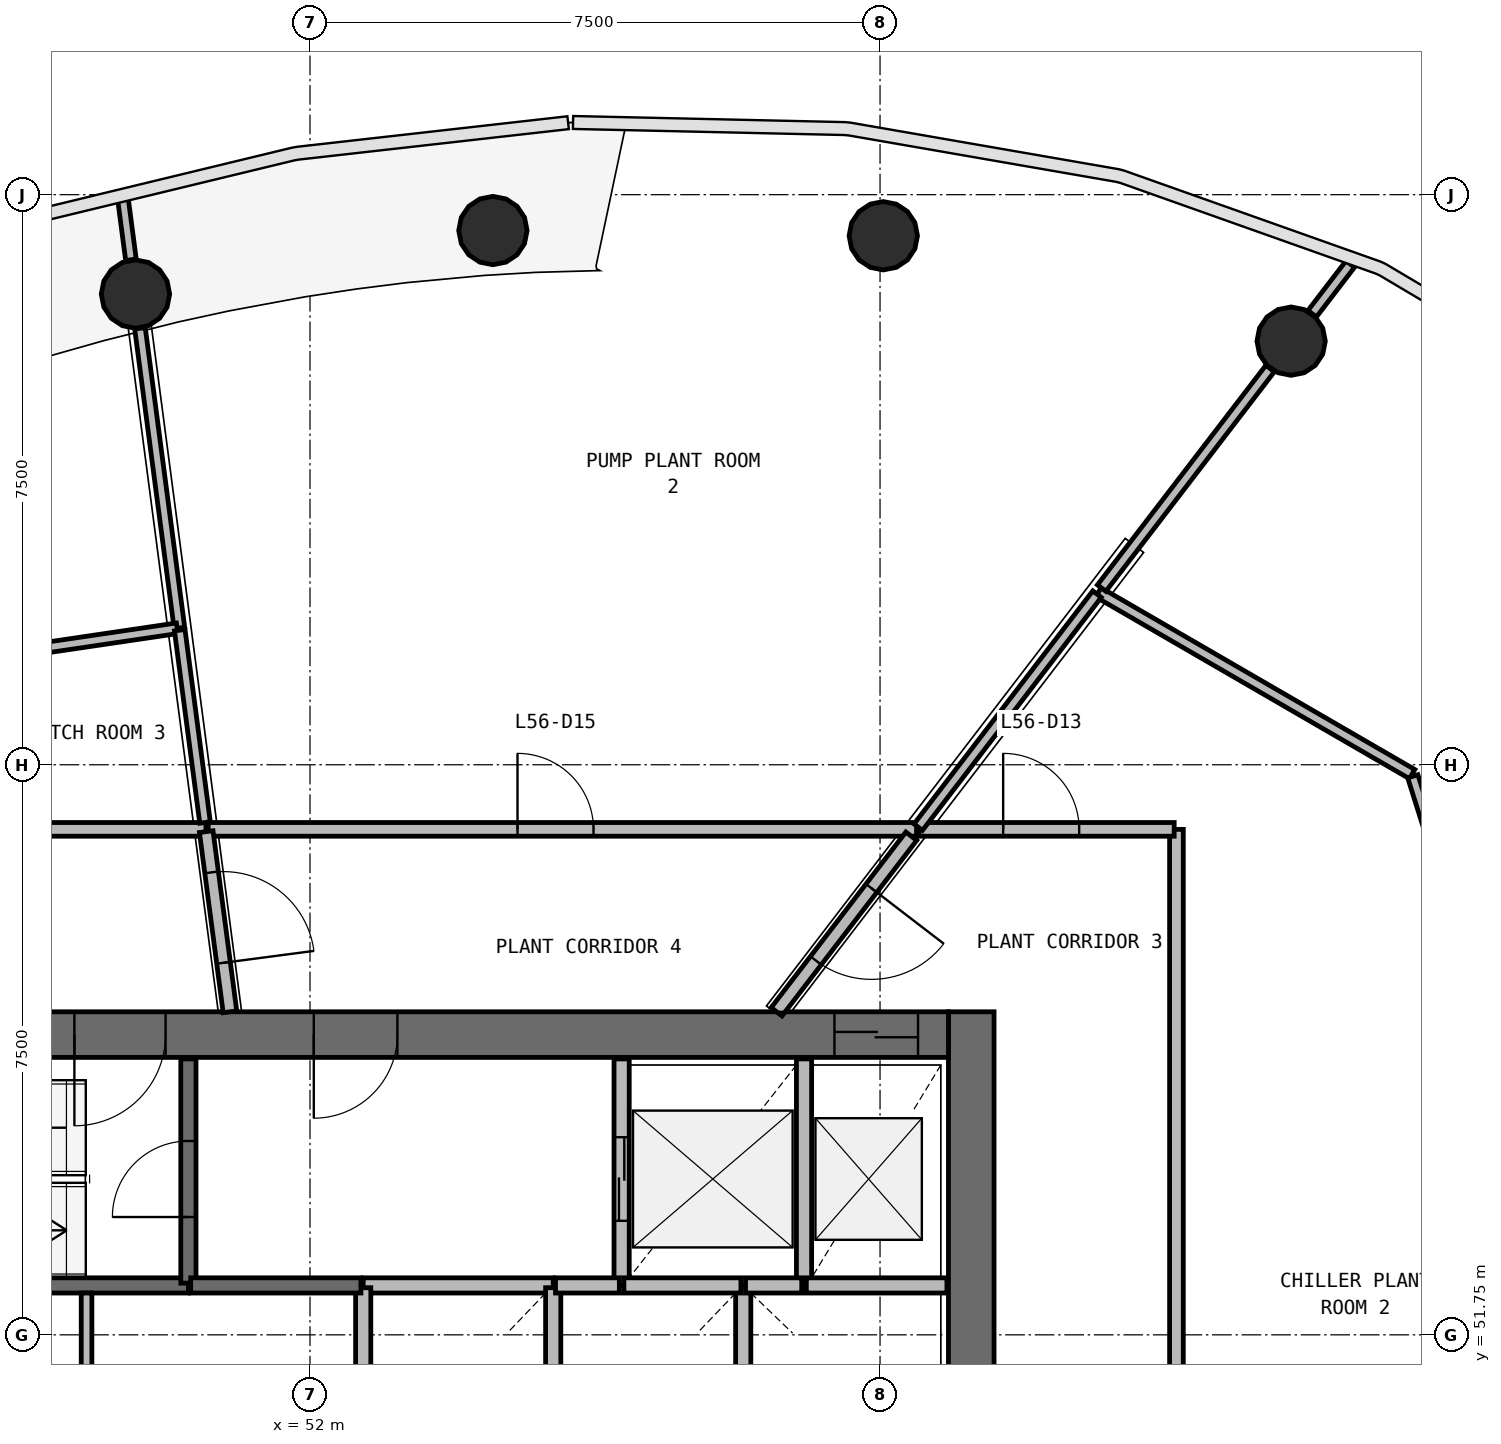
"""IFC4 building model, lengths in metres.
Left out: names, types, materials, properties, quantities, classifications, styles, units other than length and angle.
Written with IfcOpenShell. Run it as: python <this file> out.ifc"""

import sys

from ifc_helpers import new_model, si_unit, direction, frame, frame_2d, origin, origin_2d, place, context, subcontext, project, spatial, rectangle, circle, extrude, source, transform, mapped, element, fill, save


model = new_model("IFC4")
c1 = context("Model", 3, precision=1e-05, world=origin(), true_north=direction((0.0, 1.0)))
c2 = subcontext(c1, "Body", "Model", "MODEL_VIEW")
j1 = project(units=[si_unit("LENGTHUNIT", "METRE"), si_unit("PLANEANGLEUNIT", "RADIAN")], contexts=[c1])
p1 = place(None, origin())
s1 = spatial("IfcSite", under=j1, at=p1, CompositionType="ELEMENT")
p2 = place(p1, origin())
s2 = spatial("IfcBuilding", under=s1, at=p2, CompositionType="ELEMENT")
p3 = place(p2, frame((0.0, 0.0, 230.6)))
s3 = spatial("IfcBuildingStorey", under=s2, at=p3, CompositionType="ELEMENT", Elevation=230.6)
p4 = place(p3, frame((60.7, 40.0, 0.0), z_axis=(0.0, 0.0, 1.0), x_axis=(0.0, 1.0, 0.0)))
e1 = element("IfcWall", 1, at=p4, inside=s3, PredefinedType="SHEAR", context=c2, shape_type="SweptSolid", body=[
    extrude(rectangle(XDim=16.0, YDim=0.6, at=frame_2d((8.0, 0.0))), origin(), (0.0, 0.0, 1.0), 3.9),
])
p5 = place(p4, frame((7.1, 0.0, 0.0)))
e2 = element("IfcOpeningElement", 2, at=p5, cuts=e1, PredefinedType="OPENING", context=c2, shape_type="SweptSolid", body=[
    extrude(rectangle(XDim=1.8, YDim=2.1, at=frame_2d((0.9, 1.05))), frame((0.0, 0.31, 0.0), z_axis=(0.0, -1.0, 0.0), x_axis=(1.0, 0.0, 0.0)), (0.0, 0.0, 1.0), 0.62),
])
p6 = place(p3, frame((60.4, 55.7, 0.0), z_axis=(0.0, 0.0, 1.0), x_axis=(-1.0, 0.0, 0.0)))
e3 = element("IfcWall", 3, at=p6, inside=s3, PredefinedType="SHEAR", context=c2, shape_type="SweptSolid", body=[
    extrude(rectangle(XDim=16.8, YDim=0.6, at=frame_2d((8.4, 0.0))), origin(), (0.0, 0.0, 1.0), 3.9),
])
p7 = place(p6, frame((0.4, 0.0, 0.0)))
e4 = element("IfcOpeningElement", 4, at=p7, cuts=e3, PredefinedType="OPENING", context=c2, shape_type="SweptSolid", body=[
    extrude(rectangle(XDim=1.1, YDim=2.1, at=frame_2d((0.55, 1.05))), frame((0.0, 0.31, 0.0), z_axis=(0.0, -1.0, 0.0), x_axis=(1.0, 0.0, 0.0)), (0.0, 0.0, 1.0), 0.62),
])
p8 = place(p6, frame((10.3, 0.0, 0.0)))
e5 = element("IfcOpeningElement", 5, at=p8, cuts=e3, PredefinedType="OPENING", context=c2, shape_type="SweptSolid", body=[
    extrude(rectangle(XDim=1.2, YDim=2.1, at=frame_2d((0.6, 1.05))), frame((0.0, 0.31, 0.0), z_axis=(0.0, -1.0, 0.0), x_axis=(1.0, 0.0, 0.0)), (0.0, 0.0, 1.0), 0.62),
])
p9 = place(p6, frame((7.25, 0.0, 0.0)))
e6 = element("IfcOpeningElement", 6, at=p9, cuts=e3, PredefinedType="OPENING", context=c2, shape_type="SweptSolid", body=[
    extrude(rectangle(XDim=1.1, YDim=2.1, at=frame_2d((0.55, 1.05))), frame((0.0, 0.31, 0.0), z_axis=(0.0, -1.0, 0.0), x_axis=(1.0, 0.0, 0.0)), (0.0, 0.0, 1.0), 0.62),
])
m1 = source(origin(), c2, "Body", "SweptSolid", [
    extrude(circle(Radius=0.45, at=origin_2d()), origin(), (0.0, 0.0, 1.0), 3.58),
])
for number, where, z_axis, x_axis in (
    (7, (64.909, 64.823, 0.0), (0.0, 0.0, 1.0), (1.0, 0.0, 0.0)),
    (8, (59.543, 66.21, 0.0), (0.0, 0.0, 1.0), (1.0, 0.0, 0.0)),
    (9, (54.406, 66.278, 0.0), (0.0, 0.0, 1.0), (1.0, 0.0, 0.0)),
    (10, (49.704, 65.442, 0.0), (0.0, 0.0, 1.0), (1.0, 0.0, 0.0)),
):
    element("IfcColumn", number, at=place(p3, frame(where, z_axis=z_axis, x_axis=x_axis)), inside=s3, PredefinedType="COLUMN", context=c2, shape_type="MappedRepresentation", body=[
        mapped(m1, transform((0.0, 0.0, 0.0), scale=1.0)),
    ])
p10 = place(p3, frame((43.62, 52.4, 0.0), z_axis=(0.0, 0.0, 1.0), x_axis=(1.0, 0.0, 0.0)))
e11 = element("IfcWall", 11, at=p10, inside=s3, PredefinedType="SOLIDWALL", context=c2, shape_type="SweptSolid", body=[
    extrude(rectangle(XDim=6.78, YDim=0.2, at=frame_2d((3.39, 0.0))), origin(), (0.0, 0.0, 1.0), 3.58),
])
p11 = place(p3, frame((50.4, 52.43, 0.0), z_axis=(0.0, 0.0, 1.0), x_axis=(0.0, 1.0, 0.0)))
e12 = element("IfcWall", 12, at=p11, inside=s3, PredefinedType="SOLIDWALL", context=c2, shape_type="SweptSolid", body=[
    extrude(rectangle(XDim=2.95, YDim=0.2, at=frame_2d((1.475, 0.0))), origin(), (0.0, 0.0, 1.0), 3.58),
])
p12 = place(p11, frame((0.87, 0.0, 0.0)))
e13 = element("IfcOpeningElement", 13, at=p12, cuts=e12, PredefinedType="OPENING", context=c2, shape_type="SweptSolid", body=[
    extrude(rectangle(XDim=1.0, YDim=2.1, at=frame_2d((0.5, 1.05))), frame((0.0, 0.11, 0.0), z_axis=(0.0, -1.0, 0.0), x_axis=(1.0, 0.0, 0.0)), (0.0, 0.0, 1.0), 0.22),
])
p13 = place(p3, frame((56.1, 55.38, 0.0), z_axis=(0.0, 0.0, 1.0), x_axis=(0.0, -1.0, 0.0)))
e14 = element("IfcWall", 14, at=p13, inside=s3, PredefinedType="SOLIDWALL", context=c2, shape_type="SweptSolid", body=[
    extrude(rectangle(XDim=2.98, YDim=0.2, at=frame_2d((1.49, 0.0))), origin(), (0.0, 0.0, 1.0), 3.58),
])
p14 = place(p13, frame((1.03, 0.0, 0.0)))
e15 = element("IfcOpeningElement", 15, at=p14, cuts=e14, PredefinedType="OPENING", context=c2, shape_type="SweptSolid", body=[
    extrude(rectangle(XDim=1.1, YDim=2.1, at=frame_2d((0.55, 1.05))), frame((0.0, 0.11, 0.0), z_axis=(0.0, -1.0, 0.0), x_axis=(1.0, 0.0, 0.0)), (0.0, 0.0, 1.0), 0.22),
])
p15 = place(p3, frame((58.5, 52.4, 0.0), z_axis=(0.0, 0.0, 1.0), x_axis=(0.0, 1.0, 0.0)))
e16 = element("IfcWall", 16, at=p15, inside=s3, PredefinedType="SOLIDWALL", context=c2, shape_type="SweptSolid", body=[
    extrude(rectangle(XDim=2.98, YDim=0.2, at=frame_2d((1.49, 0.0))), origin(), (0.0, 0.0, 1.0), 3.58),
])
p16 = place(p3, frame((55.2, 52.4, 0.0), z_axis=(0.0, 0.0, 1.0), x_axis=(-1.0, 0.0, 0.0)))
e17 = element("IfcWall", 17, at=p16, inside=s3, PredefinedType="SOLIDWALL", context=c2, shape_type="SweptSolid", body=[
    extrude(rectangle(XDim=2.5, YDim=0.2, at=frame_2d((1.25, 0.0))), origin(), (0.0, 0.0, 1.0), 3.58),
])
for number, where, z_axis, x_axis in (
    (18, (52.7, 52.37, 0.0), (0.0, 0.0, 1.0), (0.0, -1.0, 0.0)),
    (19, (55.2, 50.01, 0.0), (0.0, 0.0, 1.0), (0.0, 1.0, 0.0)),
):
    element("IfcWall", number, at=place(p3, frame(where, z_axis=z_axis, x_axis=x_axis)), inside=s3, PredefinedType="SOLIDWALL", context=c2, shape_type="SweptSolid", body=[
        extrude(rectangle(XDim=2.36, YDim=0.2, at=frame_2d((1.18, 0.0))), origin(), (0.0, 0.0, 1.0), 3.58),
    ])
p17 = place(p3, frame((57.7, 50.01, 0.0), z_axis=(0.0, 0.0, 1.0), x_axis=(0.0, 1.0, 0.0)))
e20 = element("IfcWall", 20, at=p17, inside=s3, PredefinedType="SOLIDWALL", context=c2, shape_type="SweptSolid", body=[
    extrude(rectangle(XDim=2.39, YDim=0.2, at=frame_2d((1.195, 0.0))), origin(), (0.0, 0.0, 1.0), 3.58),
])
p18 = place(p3, frame((50.43, 52.4, 0.0), z_axis=(0.0, 0.0, 1.0), x_axis=(1.0, 0.0, 0.0)))
e21 = element("IfcWall", 21, at=p18, inside=s3, PredefinedType="SOLIDWALL", context=c2, shape_type="SweptSolid", body=[
    extrude(rectangle(XDim=2.24, YDim=0.2, at=frame_2d((1.12, 0.0))), origin(), (0.0, 0.0, 1.0), 3.58),
])
p19 = place(p3, frame((60.38, 52.4, 0.0), z_axis=(0.0, 0.0, 1.0), x_axis=(-1.0, 0.0, 0.0)))
e22 = element("IfcWall", 22, at=p19, inside=s3, PredefinedType="SOLIDWALL", context=c2, shape_type="SweptSolid", body=[
    extrude(rectangle(XDim=1.85, YDim=0.2, at=frame_2d((0.925, 0.0))), origin(), (0.0, 0.0, 1.0), 3.58),
])
p20 = place(p3, frame((57.67, 52.4, 0.0), z_axis=(0.0, 0.0, 1.0), x_axis=(-1.0, 0.0, 0.0)))
e23 = element("IfcWall", 23, at=p20, inside=s3, PredefinedType="SOLIDWALL", context=c2, shape_type="SweptSolid", body=[
    extrude(rectangle(XDim=1.54, YDim=0.2, at=frame_2d((0.77, 0.0))), origin(), (0.0, 0.0, 1.0), 3.58),
])
p21 = place(p3, frame((56.07, 52.4, 0.0), z_axis=(0.0, 0.0, 1.0), x_axis=(-1.0, 0.0, 0.0)))
e24 = element("IfcWall", 24, at=p21, inside=s3, PredefinedType="SOLIDWALL", context=c2, shape_type="SweptSolid", body=[
    extrude(rectangle(XDim=0.84, YDim=0.2, at=frame_2d((0.42, 0.0))), origin(), (0.0, 0.0, 1.0), 3.58),
])
p22 = place(p3, frame((58.47, 52.4, 0.0), z_axis=(0.0, 0.0, 1.0), x_axis=(-1.0, 0.0, 0.0)))
e25 = element("IfcWall", 25, at=p22, inside=s3, PredefinedType="SOLIDWALL", context=c2, shape_type="SweptSolid", body=[
    extrude(rectangle(XDim=0.74, YDim=0.2, at=frame_2d((0.37, 0.0))), origin(), (0.0, 0.0, 1.0), 3.58),
])
p23 = place(p3, frame((40.6, 58.4, 0.0), z_axis=(0.0, 0.0, 1.0), x_axis=(1.0, 0.0, 0.0)))
e26 = element("IfcWall", 26, at=p23, inside=s3, PredefinedType="PARTITIONING", context=c2, shape_type="SweptSolid", body=[
    extrude(rectangle(XDim=10.031, YDim=0.18, at=frame_2d((5.015, 0.0))), origin(), (0.0, 0.0, 1.0), 2.38),
])
p24 = place(p23, frame((4.581, 0.0, 0.0)))
e27 = element("IfcOpeningElement", 27, at=p24, cuts=e26, PredefinedType="OPENING", context=c2, shape_type="SweptSolid", body=[
    extrude(rectangle(XDim=1.0, YDim=2.1, at=frame_2d((0.5, 1.05))), frame((0.0, 0.1, 0.0), z_axis=(0.0, -1.0, 0.0), x_axis=(1.0, 0.0, 0.0)), (0.0, 0.0, 1.0), 0.2),
])
p25 = place(p3, frame((50.661, 58.4, 0.0), z_axis=(0.0, 0.0, 1.0), x_axis=(1.0, 0.0, 0.0)))
e28 = element("IfcWall", 28, at=p25, inside=s3, PredefinedType="PARTITIONING", context=c2, shape_type="SweptSolid", body=[
    extrude(rectangle(XDim=9.319, YDim=0.18, at=frame_2d((4.66, 0.0))), origin(), (0.0, 0.0, 1.0), 2.38),
])
p26 = place(p25, frame((4.069, 0.0, 0.0)))
e29 = element("IfcOpeningElement", 29, at=p26, cuts=e28, PredefinedType="OPENING", context=c2, shape_type="SweptSolid", body=[
    extrude(rectangle(XDim=1.0, YDim=2.1, at=frame_2d((0.5, 1.05))), frame((0.0, 0.1, 0.0), z_axis=(0.0, -1.0, 0.0), x_axis=(1.0, 0.0, 0.0)), (0.0, 0.0, 1.0), 0.2),
])
p27 = place(p3, frame((63.4, 49.531, 0.0), z_axis=(0.0, 0.0, 1.0), x_axis=(0.0, 1.0, 0.0)))
e30 = element("IfcWall", 30, at=p27, inside=s3, PredefinedType="PARTITIONING", context=c2, shape_type="SweptSolid", body=[
    extrude(rectangle(XDim=8.869, YDim=0.18, at=frame_2d((4.435, 0.0))), origin(), (0.0, 0.0, 1.0), 2.38),
])
p28 = place(p3, frame((60.01, 58.4, 0.0), z_axis=(0.0, 0.0, 1.0), x_axis=(1.0, 0.0, 0.0)))
e31 = element("IfcWall", 31, at=p28, inside=s3, PredefinedType="PARTITIONING", context=c2, shape_type="SweptSolid", body=[
    extrude(rectangle(XDim=3.36, YDim=0.18, at=frame_2d((1.68, 0.0))), origin(), (0.0, 0.0, 1.0), 2.38),
])
p29 = place(p28, frame((1.11, 0.0, 0.0)))
e32 = element("IfcOpeningElement", 32, at=p29, cuts=e31, PredefinedType="OPENING", context=c2, shape_type="SweptSolid", body=[
    extrude(rectangle(XDim=1.0, YDim=2.1, at=frame_2d((0.5, 1.05))), frame((0.0, 0.1, 0.0), z_axis=(0.0, -1.0, 0.0), x_axis=(1.0, 0.0, 0.0)), (0.0, 0.0, 1.0), 0.2),
])
p30 = place(p3, frame((59.911, 58.31, 0.0), z_axis=(0.0, 0.0, 1.0), x_axis=(-0.608737787706, -0.793371480341, 0.0)))
e33 = element("IfcWall", 33, at=p30, inside=s3, PredefinedType="PARTITIONING", context=c2, shape_type="SweptSolid", body=[
    extrude(rectangle(XDim=2.912, YDim=0.18, at=frame_2d((1.456, 0.0))), origin(), (0.0, 0.0, 1.0), 2.38),
])
p31 = place(p30, frame((0.862, 0.0, 0.0)))
e34 = element("IfcOpeningElement", 34, at=p31, cuts=e33, PredefinedType="OPENING", context=c2, shape_type="SweptSolid", body=[
    extrude(rectangle(XDim=1.2, YDim=2.1, at=frame_2d((0.6, 1.05))), frame((0.0, 0.1, 0.0), z_axis=(0.0, -1.0, 0.0), x_axis=(1.0, 0.0, 0.0)), (0.0, 0.0, 1.0), 0.2),
])
p32 = place(p3, frame((50.635, 58.37, 0.0), z_axis=(0.0, 0.0, 1.0), x_axis=(0.130504701654, -0.991447690424, 0.0)))
e35 = element("IfcWall", 35, at=p32, inside=s3, PredefinedType="PARTITIONING", context=c2, shape_type="SweptSolid", body=[
    extrude(rectangle(XDim=2.391, YDim=0.18, at=frame_2d((1.195, 0.0))), origin(), (0.0, 0.0, 1.0), 2.38),
])
p33 = place(p32, frame((0.541, 0.0, 0.0)))
e36 = element("IfcOpeningElement", 36, at=p33, cuts=e35, PredefinedType="OPENING", context=c2, shape_type="SweptSolid", body=[
    extrude(rectangle(XDim=1.2, YDim=2.1, at=frame_2d((0.6, 1.05))), frame((0.0, 0.1, 0.0), z_axis=(0.0, -1.0, 0.0), x_axis=(1.0, 0.0, 0.0)), (0.0, 0.0, 1.0), 0.2),
])
p34 = place(p3, frame((66.5, 59.127, 0.0), z_axis=(0.0, 0.0, 1.0), x_axis=(-0.865241683045, 0.501354993914, 0.0)))
e37 = element("IfcWall", 37, at=p34, inside=s3, PredefinedType="PARTITIONING", context=c2, shape_type="SweptSolid", body=[
    extrude(rectangle(XDim=4.77, YDim=0.14, at=frame_2d((2.385, 0.0))), origin(), (0.0, 0.0, 1.0), 2.38),
])
p35 = place(p3, frame((66.51, 59.098, 0.0), z_axis=(0.0, 0.0, 1.0), x_axis=(0.300539528674, -0.953769359806, 0.0)))
e38 = element("IfcWall", 38, at=p35, inside=s3, PredefinedType="PARTITIONING", context=c2, shape_type="SweptSolid", body=[
    extrude(rectangle(XDim=4.719, YDim=0.14, at=frame_2d((2.359, 0.0))), origin(), (0.0, 0.0, 1.0), 2.38),
])
p36 = place(p35, frame((1.869, 0.0, 0.0)))
e39 = element("IfcOpeningElement", 39, at=p36, cuts=e38, PredefinedType="OPENING", context=c2, shape_type="SweptSolid", body=[
    extrude(rectangle(XDim=1.0, YDim=2.1, at=frame_2d((0.5, 1.05))), frame((0.0, 0.08, 0.0), z_axis=(0.0, -1.0, 0.0), x_axis=(1.0, 0.0, 0.0)), (0.0, 0.0, 1.0), 0.16),
])
p37 = place(p3, frame((50.282, 61.05, 0.0), z_axis=(0.0, 0.0, 1.0), x_axis=(-0.130554588204, 0.991441122558, 0.0)))
e40 = element("IfcWall", 40, at=p37, inside=s3, PredefinedType="PARTITIONING", context=c2, shape_type="SweptSolid", body=[
    extrude(rectangle(XDim=3.976, YDim=0.14, at=frame_2d((1.988, 0.0))), origin(), (0.0, 0.0, 1.0), 2.38),
])
p38 = place(p3, frame((60.002, 58.429, 0.0), z_axis=(0.0, 0.0, 1.0), x_axis=(0.608748505227, 0.79336325689, 0.0)))
e41 = element("IfcWall", 41, at=p38, inside=s3, PredefinedType="PARTITIONING", context=c2, shape_type="SweptSolid", body=[
    extrude(rectangle(XDim=3.864, YDim=0.14, at=frame_2d((1.932, 0.0))), origin(), (0.0, 0.0, 1.0), 2.38),
])
p39 = place(p3, frame((62.416, 61.574, 0.0), z_axis=(0.0, 0.0, 1.0), x_axis=(0.608773631009, 0.793343977218, 0.0)))
e42 = element("IfcWall", 42, at=p39, inside=s3, PredefinedType="PARTITIONING", context=c2, shape_type="SweptSolid", body=[
    extrude(rectangle(XDim=3.64, YDim=0.14, at=frame_2d((1.82, 0.0))), origin(), (0.0, 0.0, 1.0), 2.38),
])
p40 = place(p3, frame((50.252, 61.046, 0.0), z_axis=(0.0, 0.0, 1.0), x_axis=(-0.989248976664, -0.146241109711, 0.0)))
e43 = element("IfcWall", 43, at=p40, inside=s3, PredefinedType="PARTITIONING", context=c2, shape_type="SweptSolid", body=[
    extrude(rectangle(XDim=3.452, YDim=0.14, at=frame_2d((1.726, 0.0))), origin(), (0.0, 0.0, 1.0), 2.38),
])
p41 = place(p3, frame((50.619, 58.49, 0.0), z_axis=(0.0, 0.0, 1.0), x_axis=(-0.130471833124, 0.991452016369, 0.0)))
e44 = element("IfcWall", 44, at=p41, inside=s3, PredefinedType="PARTITIONING", context=c2, shape_type="SweptSolid", body=[
    extrude(rectangle(XDim=2.552, YDim=0.14, at=frame_2d((1.276, 0.0))), origin(), (0.0, 0.0, 1.0), 2.38),
])
p42 = place(p3, frame((49.06, 50.01, 0.0), z_axis=(0.0, 0.0, 1.0), x_axis=(0.0, 1.0, 0.0)))
e45 = element("IfcWall", 45, at=p42, inside=s3, PredefinedType="PARTITIONING", context=c2, shape_type="SweptSolid", body=[
    extrude(rectangle(XDim=2.29, YDim=0.14, at=frame_2d((1.145, 0.0))), origin(), (0.0, 0.0, 1.0), 2.88),
])
p43 = place(p3, frame((65.186, 65.184, 0.0), z_axis=(0.0, 0.0, 1.0), x_axis=(0.608636710057, 0.793449024936, 0.0)))
e46 = element("IfcWall", 46, at=p43, inside=s3, PredefinedType="PARTITIONING", context=c2, shape_type="SweptSolid", body=[
    extrude(rectangle(XDim=0.824, YDim=0.14, at=frame_2d((0.412, 0.0))), origin(), (0.0, 0.0, 1.0), 2.88),
])
p44 = place(p3, frame((49.644, 65.893, 0.0), z_axis=(0.0, 0.0, 1.0), x_axis=(-0.130414823496, 0.991459516981, 0.0)))
e47 = element("IfcWall", 47, at=p44, inside=s3, PredefinedType="PARTITIONING", context=c2, shape_type="SweptSolid", body=[
    extrude(rectangle(XDim=0.796, YDim=0.14, at=frame_2d((0.398, 0.0))), origin(), (0.0, 0.0, 1.0), 2.88),
])
m2 = source(origin(), c2, "Body", "SweptSolid", [
    extrude(rectangle(XDim=1.1, YDim=2.1, at=frame_2d((0.55, 1.05))), frame((0.0, 0.025, 0.0), z_axis=(0.0, -1.0, 0.0), x_axis=(1.0, 0.0, 0.0)), (0.0, 0.0, 1.0), 0.05),
])
p45 = place(p14, origin())
e48 = element("IfcDoor", 48, at=p45, inside=s3, OperationType="DOUBLE_DOOR_SLIDING", PredefinedType="USERDEFINED", context=c2, shape_type="MappedRepresentation", body=[
    mapped(m2, transform((0.0, 0.0, 0.0), scale=1.0)),
])
fill(e15, e48)
p46 = place(p7, origin())
e49 = element("IfcDoor", 49, at=p46, inside=s3, OperationType="DOUBLE_DOOR_SLIDING", PredefinedType="USERDEFINED", context=c2, shape_type="MappedRepresentation", body=[
    mapped(m2, transform((0.0, 0.0, 0.0), scale=1.0)),
])
fill(e4, e49)
m3 = source(origin(), c2, "Body", "SweptSolid", [
    extrude(rectangle(XDim=1.2, YDim=2.1, at=frame_2d((0.6, 1.05))), frame((0.0, 0.025, 0.0), z_axis=(0.0, -1.0, 0.0), x_axis=(1.0, 0.0, 0.0)), (0.0, 0.0, 1.0), 0.05),
])
p47 = place(p8, origin())
e50 = element("IfcDoor", 50, at=p47, inside=s3, OperationType="SINGLE_SWING_RIGHT", PredefinedType="DOOR", context=c2, shape_type="MappedRepresentation", body=[
    mapped(m3, transform((0.0, 0.0, 0.0), scale=1.0)),
])
fill(e5, e50)
m4 = source(origin(), c2, "Body", "SweptSolid", [
    extrude(rectangle(XDim=1.0, YDim=2.1, at=frame_2d((0.5, 1.05))), frame((0.0, 0.025, 0.0), z_axis=(0.0, -1.0, 0.0), x_axis=(1.0, 0.0, 0.0)), (0.0, 0.0, 1.0), 0.05),
])
p48 = place(p12, origin())
e51 = element("IfcDoor", 51, at=p48, inside=s3, OperationType="SINGLE_SWING_LEFT", PredefinedType="DOOR", context=c2, shape_type="MappedRepresentation", body=[
    mapped(m4, transform((0.0, 0.0, 0.0), scale=1.0)),
])
fill(e13, e51)
m5 = source(origin(), c2, "Body", "SweptSolid", [
    extrude(rectangle(XDim=1.1, YDim=2.1, at=frame_2d((0.55, 1.05))), frame((0.0, 0.025, 0.0), z_axis=(0.0, -1.0, 0.0), x_axis=(1.0, 0.0, 0.0)), (0.0, 0.0, 1.0), 0.05),
])
p49 = place(p9, origin())
e52 = element("IfcDoor", 52, at=p49, inside=s3, OperationType="SINGLE_SWING_RIGHT", PredefinedType="DOOR", context=c2, shape_type="MappedRepresentation", body=[
    mapped(m5, transform((0.0, 0.0, 0.0), scale=1.0)),
])
fill(e6, e52)
m6 = source(origin(), c2, "Body", "SweptSolid", [
    extrude(rectangle(XDim=1.0, YDim=2.1, at=frame_2d((0.5, 1.05))), frame((0.0, 0.025, 0.0), z_axis=(0.0, -1.0, 0.0), x_axis=(1.0, 0.0, 0.0)), (0.0, 0.0, 1.0), 0.05),
])
p50 = place(p29, origin())
e53 = element("IfcDoor", 53, at=p50, inside=s3, OperationType="SINGLE_SWING_LEFT", PredefinedType="DOOR", context=c2, shape_type="MappedRepresentation", body=[
    mapped(m6, transform((0.0, 0.0, 0.0), scale=1.0)),
])
fill(e32, e53)
p51 = place(p26, origin())
e54 = element("IfcDoor", 54, at=p51, inside=s3, OperationType="SINGLE_SWING_LEFT", PredefinedType="DOOR", context=c2, shape_type="MappedRepresentation", body=[
    mapped(m6, transform((0.0, 0.0, 0.0), scale=1.0)),
])
fill(e29, e54)
m7 = source(origin(), c2, "Body", "SweptSolid", [
    extrude(rectangle(XDim=1.2, YDim=2.1, at=frame_2d((0.6, 1.05))), frame((0.0, 0.025, 0.0), z_axis=(0.0, -1.0, 0.0), x_axis=(1.0, 0.0, 0.0)), (0.0, 0.0, 1.0), 0.05),
])
p52 = place(p31, origin())
e55 = element("IfcDoor", 55, at=p52, inside=s3, OperationType="SINGLE_SWING_LEFT", PredefinedType="DOOR", context=c2, shape_type="MappedRepresentation", body=[
    mapped(m7, transform((0.0, 0.0, 0.0), scale=1.0)),
])
fill(e34, e55)
p53 = place(p33, origin())
e56 = element("IfcDoor", 56, at=p53, inside=s3, OperationType="SINGLE_SWING_RIGHT", PredefinedType="DOOR", context=c2, shape_type="MappedRepresentation", body=[
    mapped(m7, transform((0.0, 0.0, 0.0), scale=1.0)),
])
fill(e36, e56)
save(model, sys.argv[1])
